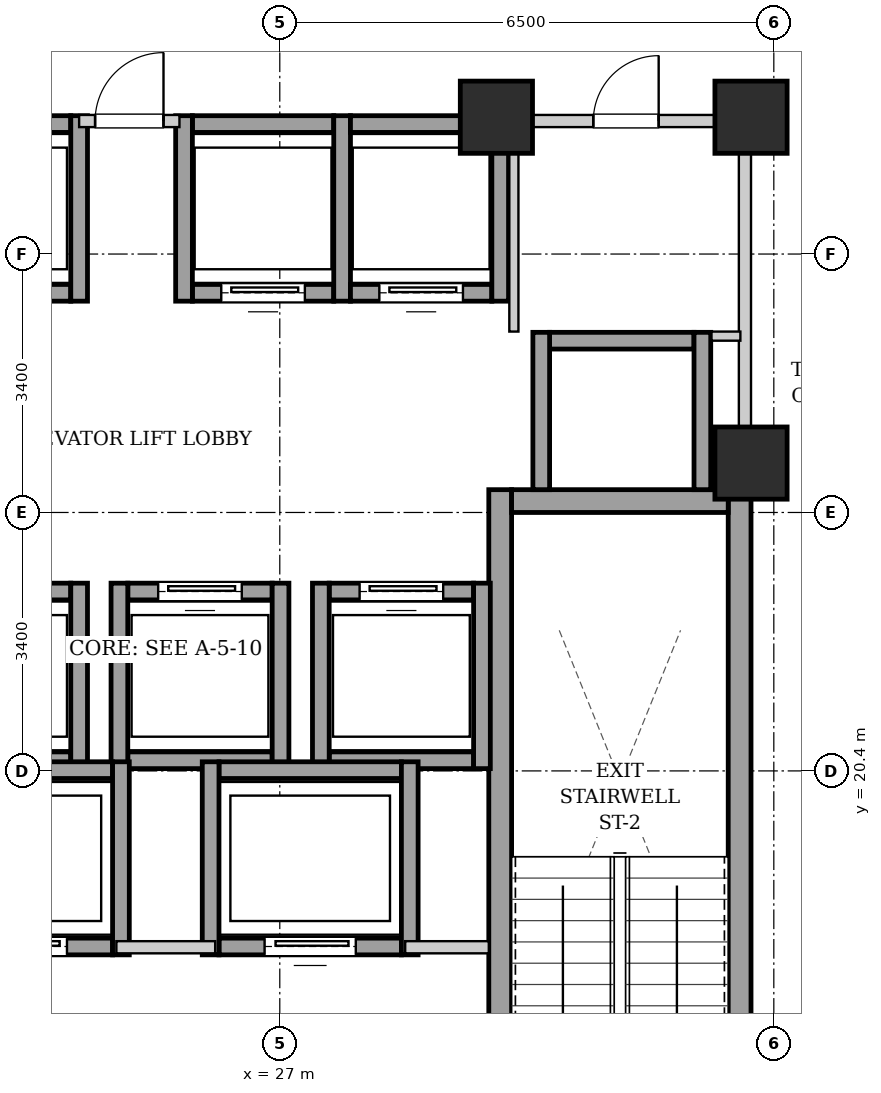
"""IFC4 building model, lengths in metres.
Left out: names, types, materials, properties, quantities, classifications, styles, units other than length and angle.
Written with IfcOpenShell. Run it as: python <this file> out.ifc"""

import sys

from ifc_helpers import new_model, si_unit, direction, frame, frame_2d, origin, origin_2d, place, context, subcontext, project, spatial, rectangle, extrude, element, fill, save


model = new_model("IFC4")
c1 = context("Model", 3, precision=1e-05, world=origin(), true_north=direction((0.0, 1.0)))
c2 = subcontext(c1, "Body", "Model", "MODEL_VIEW")
j1 = project(units=[si_unit("LENGTHUNIT", "METRE"), si_unit("PLANEANGLEUNIT", "RADIAN")], contexts=[c1])
p1 = place(None, origin())
s1 = spatial("IfcSite", under=j1, at=p1, CompositionType="ELEMENT")
p2 = place(p1, origin())
s2 = spatial("IfcBuilding", under=s1, at=p2, CompositionType="ELEMENT")
p3 = place(p2, frame((0.0, 0.0, 124.4)))
s3 = spatial("IfcBuildingStorey", under=s2, at=p3, CompositionType="ELEMENT", Elevation=124.4)
for number, where, z_axis, x_axis in (
    (1, (29.85, 29.0, 0.0), (0.0, 0.0, 1.0), (1.0, 0.0, 0.0)),
    (2, (33.2, 29.0, 0.0), (0.0, 0.0, 1.0), (1.0, 0.0, 0.0)),
    (3, (33.2, 24.45, 0.0), (0.0, 0.0, 1.0), (1.0, 0.0, 0.0)),
):
    element("IfcColumn", number, at=place(p3, frame(where, z_axis=z_axis, x_axis=x_axis)), inside=s3, PredefinedType="COLUMN", context=c2, shape_type="SweptSolid", body=[
        extrude(rectangle(XDim=0.95, YDim=0.95, at=origin_2d()), origin(), (0.0, 0.0, 1.0), 3.25),
    ])
for number, where, z_axis, x_axis in (
    (4, (29.9, 15.1, 0.0), (0.0, 0.0, 1.0), (0.0, 1.0, 0.0)),
    (5, (33.05, 15.1, 0.0), (0.0, 0.0, 1.0), (0.0, 1.0, 0.0)),
):
    element("IfcWall", number, at=place(p3, frame(where, z_axis=z_axis, x_axis=x_axis)), inside=s3, PredefinedType="SHEAR", context=c2, shape_type="SweptSolid", body=[
        extrude(rectangle(XDim=9.0, YDim=0.3, at=frame_2d((4.5, 0.0))), origin(), (0.0, 0.0, 1.0), 2.99),
    ])
p4 = place(p3, frame((30.05, 23.95, 0.0), z_axis=(0.0, 0.0, 1.0), x_axis=(1.0, 0.0, 0.0)))
e6 = element("IfcWall", 6, at=p4, inside=s3, PredefinedType="SHEAR", context=c2, shape_type="SweptSolid", body=[
    extrude(rectangle(XDim=2.85, YDim=0.3, at=frame_2d((1.425, 0.0))), origin(), (0.0, 0.0, 1.0), 2.99),
])
p5 = place(p3, frame((22.35, 26.69, 0.0), z_axis=(0.0, 0.0, 1.0), x_axis=(1.0, 0.0, 0.0)))
e7 = element("IfcWall", 7, at=p5, inside=s3, PredefinedType="SHEAR", context=c2, shape_type="SweptSolid", body=[
    extrude(rectangle(XDim=1.9, YDim=0.22, at=frame_2d((0.95, 0.0))), origin(), (0.0, 0.0, 1.0), 2.99),
])
p6 = place(p5, frame((0.4, 0.0, 0.0)))
e8 = element("IfcOpeningElement", 8, at=p6, cuts=e7, PredefinedType="OPENING", context=c2, shape_type="SweptSolid", body=[
    extrude(rectangle(XDim=1.1, YDim=2.15, at=frame_2d((0.55, 1.075))), frame((0.0, 0.12, 0.0), z_axis=(0.0, -1.0, 0.0), x_axis=(1.0, 0.0, 0.0)), (0.0, 0.0, 1.0), 0.24),
])
p7 = place(p3, frame((22.35, 28.91, 0.0), z_axis=(0.0, 0.0, 1.0), x_axis=(1.0, 0.0, 0.0)))
e9 = element("IfcWall", 9, at=p7, inside=s3, PredefinedType="SHEAR", context=c2, shape_type="SweptSolid", body=[
    extrude(rectangle(XDim=1.9, YDim=0.22, at=frame_2d((0.95, 0.0))), origin(), (0.0, 0.0, 1.0), 2.99),
])
p8 = place(p3, frame((24.36, 26.58, 0.0), z_axis=(0.0, 0.0, 1.0), x_axis=(0.0, 1.0, 0.0)))
e10 = element("IfcWall", 10, at=p8, inside=s3, PredefinedType="SHEAR", context=c2, shape_type="SweptSolid", body=[
    extrude(rectangle(XDim=2.44, YDim=0.22, at=frame_2d((1.22, 0.0))), origin(), (0.0, 0.0, 1.0), 2.99),
])
p9 = place(p3, frame((25.85, 26.69, 0.0), z_axis=(0.0, 0.0, 1.0), x_axis=(1.0, 0.0, 0.0)))
e11 = element("IfcWall", 11, at=p9, inside=s3, PredefinedType="SHEAR", context=c2, shape_type="SweptSolid", body=[
    extrude(rectangle(XDim=1.86, YDim=0.22, at=frame_2d((0.93, 0.0))), origin(), (0.0, 0.0, 1.0), 2.99),
])
p10 = place(p9, frame((0.38, 0.0, 0.0)))
e12 = element("IfcOpeningElement", 12, at=p10, cuts=e11, PredefinedType="OPENING", context=c2, shape_type="SweptSolid", body=[
    extrude(rectangle(XDim=1.1, YDim=2.15, at=frame_2d((0.55, 1.075))), frame((0.0, 0.12, 0.0), z_axis=(0.0, -1.0, 0.0), x_axis=(1.0, 0.0, 0.0)), (0.0, 0.0, 1.0), 0.24),
])
p11 = place(p3, frame((25.85, 28.91, 0.0), z_axis=(0.0, 0.0, 1.0), x_axis=(1.0, 0.0, 0.0)))
e13 = element("IfcWall", 13, at=p11, inside=s3, PredefinedType="SHEAR", context=c2, shape_type="SweptSolid", body=[
    extrude(rectangle(XDim=1.86, YDim=0.22, at=frame_2d((0.93, 0.0))), origin(), (0.0, 0.0, 1.0), 2.99),
])
for number, where, z_axis, x_axis in (
    (14, (25.74, 26.58, 0.0), (0.0, 0.0, 1.0), (0.0, 1.0, 0.0)),
    (15, (27.82, 26.58, 0.0), (0.0, 0.0, 1.0), (0.0, 1.0, 0.0)),
):
    element("IfcWall", number, at=place(p3, frame(where, z_axis=z_axis, x_axis=x_axis)), inside=s3, PredefinedType="SHEAR", context=c2, shape_type="SweptSolid", body=[
        extrude(rectangle(XDim=2.44, YDim=0.22, at=frame_2d((1.22, 0.0))), origin(), (0.0, 0.0, 1.0), 2.99),
    ])
p12 = place(p3, frame((27.93, 26.69, 0.0), z_axis=(0.0, 0.0, 1.0), x_axis=(1.0, 0.0, 0.0)))
e16 = element("IfcWall", 16, at=p12, inside=s3, PredefinedType="SHEAR", context=c2, shape_type="SweptSolid", body=[
    extrude(rectangle(XDim=1.86, YDim=0.22, at=frame_2d((0.93, 0.0))), origin(), (0.0, 0.0, 1.0), 2.99),
])
p13 = place(p12, frame((0.38, 0.0, 0.0)))
e17 = element("IfcOpeningElement", 17, at=p13, cuts=e16, PredefinedType="OPENING", context=c2, shape_type="SweptSolid", body=[
    extrude(rectangle(XDim=1.1, YDim=2.15, at=frame_2d((0.55, 1.075))), frame((0.0, 0.12, 0.0), z_axis=(0.0, -1.0, 0.0), x_axis=(1.0, 0.0, 0.0)), (0.0, 0.0, 1.0), 0.24),
])
p14 = place(p3, frame((27.93, 28.91, 0.0), z_axis=(0.0, 0.0, 1.0), x_axis=(1.0, 0.0, 0.0)))
e18 = element("IfcWall", 18, at=p14, inside=s3, PredefinedType="SHEAR", context=c2, shape_type="SweptSolid", body=[
    extrude(rectangle(XDim=1.86, YDim=0.22, at=frame_2d((0.93, 0.0))), origin(), (0.0, 0.0, 1.0), 2.99),
])
p15 = place(p3, frame((29.9, 26.58, 0.0), z_axis=(0.0, 0.0, 1.0), x_axis=(0.0, 1.0, 0.0)))
e19 = element("IfcWall", 19, at=p15, inside=s3, PredefinedType="SHEAR", context=c2, shape_type="SweptSolid", body=[
    extrude(rectangle(XDim=2.44, YDim=0.22, at=frame_2d((1.22, 0.0))), origin(), (0.0, 0.0, 1.0), 2.99),
])
p16 = place(p3, frame((22.35, 20.54, 0.0), z_axis=(0.0, 0.0, 1.0), x_axis=(1.0, 0.0, 0.0)))
e20 = element("IfcWall", 20, at=p16, inside=s3, PredefinedType="SHEAR", context=c2, shape_type="SweptSolid", body=[
    extrude(rectangle(XDim=1.9, YDim=0.22, at=frame_2d((0.95, 0.0))), origin(), (0.0, 0.0, 1.0), 2.99),
])
p17 = place(p3, frame((22.35, 22.76, 0.0), z_axis=(0.0, 0.0, 1.0), x_axis=(1.0, 0.0, 0.0)))
e21 = element("IfcWall", 21, at=p17, inside=s3, PredefinedType="SHEAR", context=c2, shape_type="SweptSolid", body=[
    extrude(rectangle(XDim=1.9, YDim=0.22, at=frame_2d((0.95, 0.0))), origin(), (0.0, 0.0, 1.0), 2.99),
])
p18 = place(p17, frame((0.4, 0.0, 0.0)))
e22 = element("IfcOpeningElement", 22, at=p18, cuts=e21, PredefinedType="OPENING", context=c2, shape_type="SweptSolid", body=[
    extrude(rectangle(XDim=1.1, YDim=2.15, at=frame_2d((0.55, 1.075))), frame((0.0, 0.12, 0.0), z_axis=(0.0, -1.0, 0.0), x_axis=(1.0, 0.0, 0.0)), (0.0, 0.0, 1.0), 0.24),
])
p19 = place(p3, frame((24.36, 20.43, 0.0), z_axis=(0.0, 0.0, 1.0), x_axis=(0.0, 1.0, 0.0)))
e23 = element("IfcWall", 23, at=p19, inside=s3, PredefinedType="SHEAR", context=c2, shape_type="SweptSolid", body=[
    extrude(rectangle(XDim=2.44, YDim=0.22, at=frame_2d((1.22, 0.0))), origin(), (0.0, 0.0, 1.0), 2.99),
])
p20 = place(p3, frame((25.0, 20.54, 0.0), z_axis=(0.0, 0.0, 1.0), x_axis=(1.0, 0.0, 0.0)))
e24 = element("IfcWall", 24, at=p20, inside=s3, PredefinedType="SHEAR", context=c2, shape_type="SweptSolid", body=[
    extrude(rectangle(XDim=1.9, YDim=0.22, at=frame_2d((0.95, 0.0))), origin(), (0.0, 0.0, 1.0), 2.99),
])
p21 = place(p3, frame((25.0, 22.76, 0.0), z_axis=(0.0, 0.0, 1.0), x_axis=(1.0, 0.0, 0.0)))
e25 = element("IfcWall", 25, at=p21, inside=s3, PredefinedType="SHEAR", context=c2, shape_type="SweptSolid", body=[
    extrude(rectangle(XDim=1.9, YDim=0.22, at=frame_2d((0.95, 0.0))), origin(), (0.0, 0.0, 1.0), 2.99),
])
p22 = place(p21, frame((0.4, 0.0, 0.0)))
e26 = element("IfcOpeningElement", 26, at=p22, cuts=e25, PredefinedType="OPENING", context=c2, shape_type="SweptSolid", body=[
    extrude(rectangle(XDim=1.1, YDim=2.15, at=frame_2d((0.55, 1.075))), frame((0.0, 0.12, 0.0), z_axis=(0.0, -1.0, 0.0), x_axis=(1.0, 0.0, 0.0)), (0.0, 0.0, 1.0), 0.24),
])
for number, where, z_axis, x_axis in (
    (27, (24.89, 20.43, 0.0), (0.0, 0.0, 1.0), (0.0, 1.0, 0.0)),
    (28, (27.01, 20.43, 0.0), (0.0, 0.0, 1.0), (0.0, 1.0, 0.0)),
):
    element("IfcWall", number, at=place(p3, frame(where, z_axis=z_axis, x_axis=x_axis)), inside=s3, PredefinedType="SHEAR", context=c2, shape_type="SweptSolid", body=[
        extrude(rectangle(XDim=2.44, YDim=0.22, at=frame_2d((1.22, 0.0))), origin(), (0.0, 0.0, 1.0), 2.99),
    ])
p23 = place(p3, frame((27.65, 20.54, 0.0), z_axis=(0.0, 0.0, 1.0), x_axis=(1.0, 0.0, 0.0)))
e29 = element("IfcWall", 29, at=p23, inside=s3, PredefinedType="SHEAR", context=c2, shape_type="SweptSolid", body=[
    extrude(rectangle(XDim=1.9, YDim=0.22, at=frame_2d((0.95, 0.0))), origin(), (0.0, 0.0, 1.0), 2.99),
])
p24 = place(p3, frame((27.65, 22.76, 0.0), z_axis=(0.0, 0.0, 1.0), x_axis=(1.0, 0.0, 0.0)))
e30 = element("IfcWall", 30, at=p24, inside=s3, PredefinedType="SHEAR", context=c2, shape_type="SweptSolid", body=[
    extrude(rectangle(XDim=1.9, YDim=0.22, at=frame_2d((0.95, 0.0))), origin(), (0.0, 0.0, 1.0), 2.99),
])
p25 = place(p24, frame((0.4, 0.0, 0.0)))
e31 = element("IfcOpeningElement", 31, at=p25, cuts=e30, PredefinedType="OPENING", context=c2, shape_type="SweptSolid", body=[
    extrude(rectangle(XDim=1.1, YDim=2.15, at=frame_2d((0.55, 1.075))), frame((0.0, 0.12, 0.0), z_axis=(0.0, -1.0, 0.0), x_axis=(1.0, 0.0, 0.0)), (0.0, 0.0, 1.0), 0.24),
])
for number, where, z_axis, x_axis in (
    (32, (27.54, 20.43, 0.0), (0.0, 0.0, 1.0), (0.0, 1.0, 0.0)),
    (33, (29.66, 20.43, 0.0), (0.0, 0.0, 1.0), (0.0, 1.0, 0.0)),
):
    element("IfcWall", number, at=place(p3, frame(where, z_axis=z_axis, x_axis=x_axis)), inside=s3, PredefinedType="SHEAR", context=c2, shape_type="SweptSolid", body=[
        extrude(rectangle(XDim=2.44, YDim=0.22, at=frame_2d((1.22, 0.0))), origin(), (0.0, 0.0, 1.0), 2.99),
    ])
p26 = place(p3, frame((30.55, 26.06, 0.0), z_axis=(0.0, 0.0, 1.0), x_axis=(1.0, 0.0, 0.0)))
e34 = element("IfcWall", 34, at=p26, inside=s3, PredefinedType="SHEAR", context=c2, shape_type="SweptSolid", body=[
    extrude(rectangle(XDim=1.9, YDim=0.22, at=frame_2d((0.95, 0.0))), origin(), (0.0, 0.0, 1.0), 2.99),
])
for number, where, z_axis, x_axis in (
    (35, (30.44, 24.1, 0.0), (0.0, 0.0, 1.0), (0.0, 1.0, 0.0)),
    (36, (32.56, 24.1, 0.0), (0.0, 0.0, 1.0), (0.0, 1.0, 0.0)),
):
    element("IfcWall", number, at=place(p3, frame(where, z_axis=z_axis, x_axis=x_axis)), inside=s3, PredefinedType="SHEAR", context=c2, shape_type="SweptSolid", body=[
        extrude(rectangle(XDim=2.07, YDim=0.22, at=frame_2d((1.035, 0.0))), origin(), (0.0, 0.0, 1.0), 2.99),
    ])
p27 = place(p3, frame((22.4, 18.09, 0.0), z_axis=(0.0, 0.0, 1.0), x_axis=(1.0, 0.0, 0.0)))
e37 = element("IfcWall", 37, at=p27, inside=s3, PredefinedType="SHEAR", context=c2, shape_type="SweptSolid", body=[
    extrude(rectangle(XDim=2.4, YDim=0.22, at=frame_2d((1.2, 0.0))), origin(), (0.0, 0.0, 1.0), 2.99),
])
p28 = place(p27, frame((0.6, 0.0, 0.0)))
e38 = element("IfcOpeningElement", 38, at=p28, cuts=e37, PredefinedType="OPENING", context=c2, shape_type="SweptSolid", body=[
    extrude(rectangle(XDim=1.2, YDim=2.15, at=frame_2d((0.6, 1.075))), frame((0.0, 0.12, 0.0), z_axis=(0.0, -1.0, 0.0), x_axis=(1.0, 0.0, 0.0)), (0.0, 0.0, 1.0), 0.24),
])
p29 = place(p3, frame((22.4, 20.41, 0.0), z_axis=(0.0, 0.0, 1.0), x_axis=(1.0, 0.0, 0.0)))
e39 = element("IfcWall", 39, at=p29, inside=s3, PredefinedType="SHEAR", context=c2, shape_type="SweptSolid", body=[
    extrude(rectangle(XDim=2.4, YDim=0.22, at=frame_2d((1.2, 0.0))), origin(), (0.0, 0.0, 1.0), 2.99),
])
p30 = place(p3, frame((24.91, 17.98, 0.0), z_axis=(0.0, 0.0, 1.0), x_axis=(0.0, 1.0, 0.0)))
e40 = element("IfcWall", 40, at=p30, inside=s3, PredefinedType="SHEAR", context=c2, shape_type="SweptSolid", body=[
    extrude(rectangle(XDim=2.54, YDim=0.22, at=frame_2d((1.27, 0.0))), origin(), (0.0, 0.0, 1.0), 2.99),
])
p31 = place(p3, frame((26.2, 18.09, 0.0), z_axis=(0.0, 0.0, 1.0), x_axis=(1.0, 0.0, 0.0)))
e41 = element("IfcWall", 41, at=p31, inside=s3, PredefinedType="SHEAR", context=c2, shape_type="SweptSolid", body=[
    extrude(rectangle(XDim=2.4, YDim=0.22, at=frame_2d((1.2, 0.0))), origin(), (0.0, 0.0, 1.0), 2.99),
])
p32 = place(p31, frame((0.6, 0.0, 0.0)))
e42 = element("IfcOpeningElement", 42, at=p32, cuts=e41, PredefinedType="OPENING", context=c2, shape_type="SweptSolid", body=[
    extrude(rectangle(XDim=1.2, YDim=2.15, at=frame_2d((0.6, 1.075))), frame((0.0, 0.12, 0.0), z_axis=(0.0, -1.0, 0.0), x_axis=(1.0, 0.0, 0.0)), (0.0, 0.0, 1.0), 0.24),
])
p33 = place(p3, frame((26.2, 20.41, 0.0), z_axis=(0.0, 0.0, 1.0), x_axis=(1.0, 0.0, 0.0)))
e43 = element("IfcWall", 43, at=p33, inside=s3, PredefinedType="SHEAR", context=c2, shape_type="SweptSolid", body=[
    extrude(rectangle(XDim=2.4, YDim=0.22, at=frame_2d((1.2, 0.0))), origin(), (0.0, 0.0, 1.0), 2.99),
])
for number, where, z_axis, x_axis in (
    (44, (26.09, 17.98, 0.0), (0.0, 0.0, 1.0), (0.0, 1.0, 0.0)),
    (45, (28.71, 17.98, 0.0), (0.0, 0.0, 1.0), (0.0, 1.0, 0.0)),
):
    element("IfcWall", number, at=place(p3, frame(where, z_axis=z_axis, x_axis=x_axis)), inside=s3, PredefinedType="SHEAR", context=c2, shape_type="SweptSolid", body=[
        extrude(rectangle(XDim=2.54, YDim=0.22, at=frame_2d((1.27, 0.0))), origin(), (0.0, 0.0, 1.0), 2.99),
    ])
p34 = place(p3, frame((24.85, 18.08, 0.0), z_axis=(0.0, 0.0, 1.0), x_axis=(1.0, 0.0, 0.0)))
e46 = element("IfcWall", 46, at=p34, inside=s3, PredefinedType="PARTITIONING", context=c2, shape_type="SweptSolid", body=[
    extrude(rectangle(XDim=1.3, YDim=0.16, at=frame_2d((0.65, 0.0))), origin(), (0.0, 0.0, 1.0), 2.99),
])
p35 = place(p3, frame((28.65, 18.08, 0.0), z_axis=(0.0, 0.0, 1.0), x_axis=(1.0, 0.0, 0.0)))
e47 = element("IfcWall", 47, at=p35, inside=s3, PredefinedType="PARTITIONING", context=c2, shape_type="SweptSolid", body=[
    extrude(rectangle(XDim=1.1, YDim=0.16, at=frame_2d((0.55, 0.0))), origin(), (0.0, 0.0, 1.0), 2.99),
])
p36 = place(p3, frame((33.12, 24.12, 0.0), z_axis=(0.0, 0.0, 1.0), x_axis=(0.0, 1.0, 0.0)))
e48 = element("IfcWall", 48, at=p36, inside=s3, PredefinedType="PARTITIONING", context=c2, shape_type="SweptSolid", body=[
    extrude(rectangle(XDim=4.76, YDim=0.16, at=frame_2d((2.38, 0.0))), origin(), (0.0, 0.0, 1.0), 2.99),
])
p37 = place(p3, frame((24.36, 28.95, 0.0), z_axis=(0.0, 0.0, 1.0), x_axis=(1.0, 0.0, 0.0)))
e49 = element("IfcWall", 49, at=p37, inside=s3, PredefinedType="PARTITIONING", context=c2, shape_type="SweptSolid", body=[
    extrude(rectangle(XDim=1.32, YDim=0.16, at=frame_2d((0.66, 0.0))), origin(), (0.0, 0.0, 1.0), 2.426),
])
p38 = place(p37, frame((0.21, 0.0, 0.0)))
e50 = element("IfcOpeningElement", 50, at=p38, cuts=e49, PredefinedType="OPENING", context=c2, shape_type="SweptSolid", body=[
    extrude(rectangle(XDim=0.9, YDim=2.05, at=frame_2d((0.45, 1.025))), frame((0.0, 0.09, 0.0), z_axis=(0.0, -1.0, 0.0), x_axis=(1.0, 0.0, 0.0)), (0.0, 0.0, 1.0), 0.18),
])
p39 = place(p3, frame((30.08, 26.18, 0.0), z_axis=(0.0, 0.0, 1.0), x_axis=(0.0, 1.0, 0.0)))
e51 = element("IfcWall", 51, at=p39, inside=s3, PredefinedType="PARTITIONING", context=c2, shape_type="SweptSolid", body=[
    extrude(rectangle(XDim=2.68, YDim=0.12, at=frame_2d((1.34, 0.0))), origin(), (0.0, 0.0, 1.0), 2.99),
])
p40 = place(p3, frame((32.68, 26.12, 0.0), z_axis=(0.0, 0.0, 1.0), x_axis=(1.0, 0.0, 0.0)))
e52 = element("IfcWall", 52, at=p40, inside=s3, PredefinedType="PARTITIONING", context=c2, shape_type="SweptSolid", body=[
    extrude(rectangle(XDim=0.38, YDim=0.12, at=frame_2d((0.19, 0.0))), origin(), (0.0, 0.0, 1.0), 2.99),
])
p41 = place(p3, frame((30.08, 28.95, 0.0), z_axis=(0.0, 0.0, 1.0), x_axis=(1.0, 0.0, 0.0)))
e53 = element("IfcWall", 53, at=p41, inside=s3, PredefinedType="PARTITIONING", context=c2, shape_type="SweptSolid", body=[
    extrude(rectangle(XDim=2.96, YDim=0.16, at=frame_2d((1.48, 0.0))), origin(), (0.0, 0.0, 1.0), 2.99),
])
p42 = place(p41, frame((1.045, 0.0, 0.0)))
e54 = element("IfcOpeningElement", 54, at=p42, cuts=e53, PredefinedType="OPENING", context=c2, shape_type="SweptSolid", body=[
    extrude(rectangle(XDim=0.86, YDim=2.05, at=frame_2d((0.43, 1.025))), frame((0.0, 0.09, 0.0), z_axis=(0.0, -1.0, 0.0), x_axis=(1.0, 0.0, 0.0)), (0.0, 0.0, 1.0), 0.18),
])
p43 = place(p10, origin())
e55 = element("IfcDoor", 55, at=p43, inside=s3, OperationType="SLIDING_TO_LEFT", PredefinedType="DOOR", context=c2, shape_type="SweptSolid", body=[
    extrude(rectangle(XDim=1.1, YDim=2.15, at=frame_2d((0.55, 1.075))), frame((0.0, 0.025, 0.0), z_axis=(0.0, -1.0, 0.0), x_axis=(1.0, 0.0, 0.0)), (0.0, 0.0, 1.0), 0.05),
])
fill(e12, e55)
p44 = place(p13, origin())
e56 = element("IfcDoor", 56, at=p44, inside=s3, OperationType="SLIDING_TO_LEFT", PredefinedType="DOOR", context=c2, shape_type="SweptSolid", body=[
    extrude(rectangle(XDim=1.1, YDim=2.15, at=frame_2d((0.55, 1.075))), frame((0.0, 0.025, 0.0), z_axis=(0.0, -1.0, 0.0), x_axis=(1.0, 0.0, 0.0)), (0.0, 0.0, 1.0), 0.05),
])
fill(e17, e56)
p45 = place(p22, origin())
e57 = element("IfcDoor", 57, at=p45, inside=s3, OperationType="SLIDING_TO_LEFT", PredefinedType="DOOR", context=c2, shape_type="SweptSolid", body=[
    extrude(rectangle(XDim=1.1, YDim=2.15, at=frame_2d((0.55, 1.075))), frame((0.0, 0.025, 0.0), z_axis=(0.0, -1.0, 0.0), x_axis=(1.0, 0.0, 0.0)), (0.0, 0.0, 1.0), 0.05),
])
fill(e26, e57)
p46 = place(p25, origin())
e58 = element("IfcDoor", 58, at=p46, inside=s3, OperationType="SLIDING_TO_LEFT", PredefinedType="DOOR", context=c2, shape_type="SweptSolid", body=[
    extrude(rectangle(XDim=1.1, YDim=2.15, at=frame_2d((0.55, 1.075))), frame((0.0, 0.025, 0.0), z_axis=(0.0, -1.0, 0.0), x_axis=(1.0, 0.0, 0.0)), (0.0, 0.0, 1.0), 0.05),
])
fill(e31, e58)
p47 = place(p28, origin())
e59 = element("IfcDoor", 59, at=p47, inside=s3, OperationType="SLIDING_TO_LEFT", PredefinedType="DOOR", context=c2, shape_type="SweptSolid", body=[
    extrude(rectangle(XDim=1.2, YDim=2.15, at=frame_2d((0.6, 1.075))), frame((0.0, 0.025, 0.0), z_axis=(0.0, -1.0, 0.0), x_axis=(1.0, 0.0, 0.0)), (0.0, 0.0, 1.0), 0.05),
])
fill(e38, e59)
p48 = place(p32, origin())
e60 = element("IfcDoor", 60, at=p48, inside=s3, OperationType="SLIDING_TO_LEFT", PredefinedType="DOOR", context=c2, shape_type="SweptSolid", body=[
    extrude(rectangle(XDim=1.2, YDim=2.15, at=frame_2d((0.6, 1.075))), frame((0.0, 0.025, 0.0), z_axis=(0.0, -1.0, 0.0), x_axis=(1.0, 0.0, 0.0)), (0.0, 0.0, 1.0), 0.05),
])
fill(e42, e60)
p49 = place(p38, origin())
e61 = element("IfcDoor", 61, at=p49, inside=s3, OperationType="SINGLE_SWING_RIGHT", PredefinedType="DOOR", context=c2, shape_type="SweptSolid", body=[
    extrude(rectangle(XDim=0.9, YDim=2.05, at=frame_2d((0.45, 1.025))), frame((0.0, 0.025, 0.0), z_axis=(0.0, -1.0, 0.0), x_axis=(1.0, 0.0, 0.0)), (0.0, 0.0, 1.0), 0.05),
])
fill(e50, e61)
p50 = place(p42, origin())
e62 = element("IfcDoor", 62, at=p50, inside=s3, OperationType="SINGLE_SWING_RIGHT", PredefinedType="DOOR", context=c2, shape_type="SweptSolid", body=[
    extrude(rectangle(XDim=0.86, YDim=2.05, at=frame_2d((0.43, 1.025))), frame((0.0, 0.025, 0.0), z_axis=(0.0, -1.0, 0.0), x_axis=(1.0, 0.0, 0.0)), (0.0, 0.0, 1.0), 0.05),
])
fill(e54, e62)
save(model, sys.argv[1])
